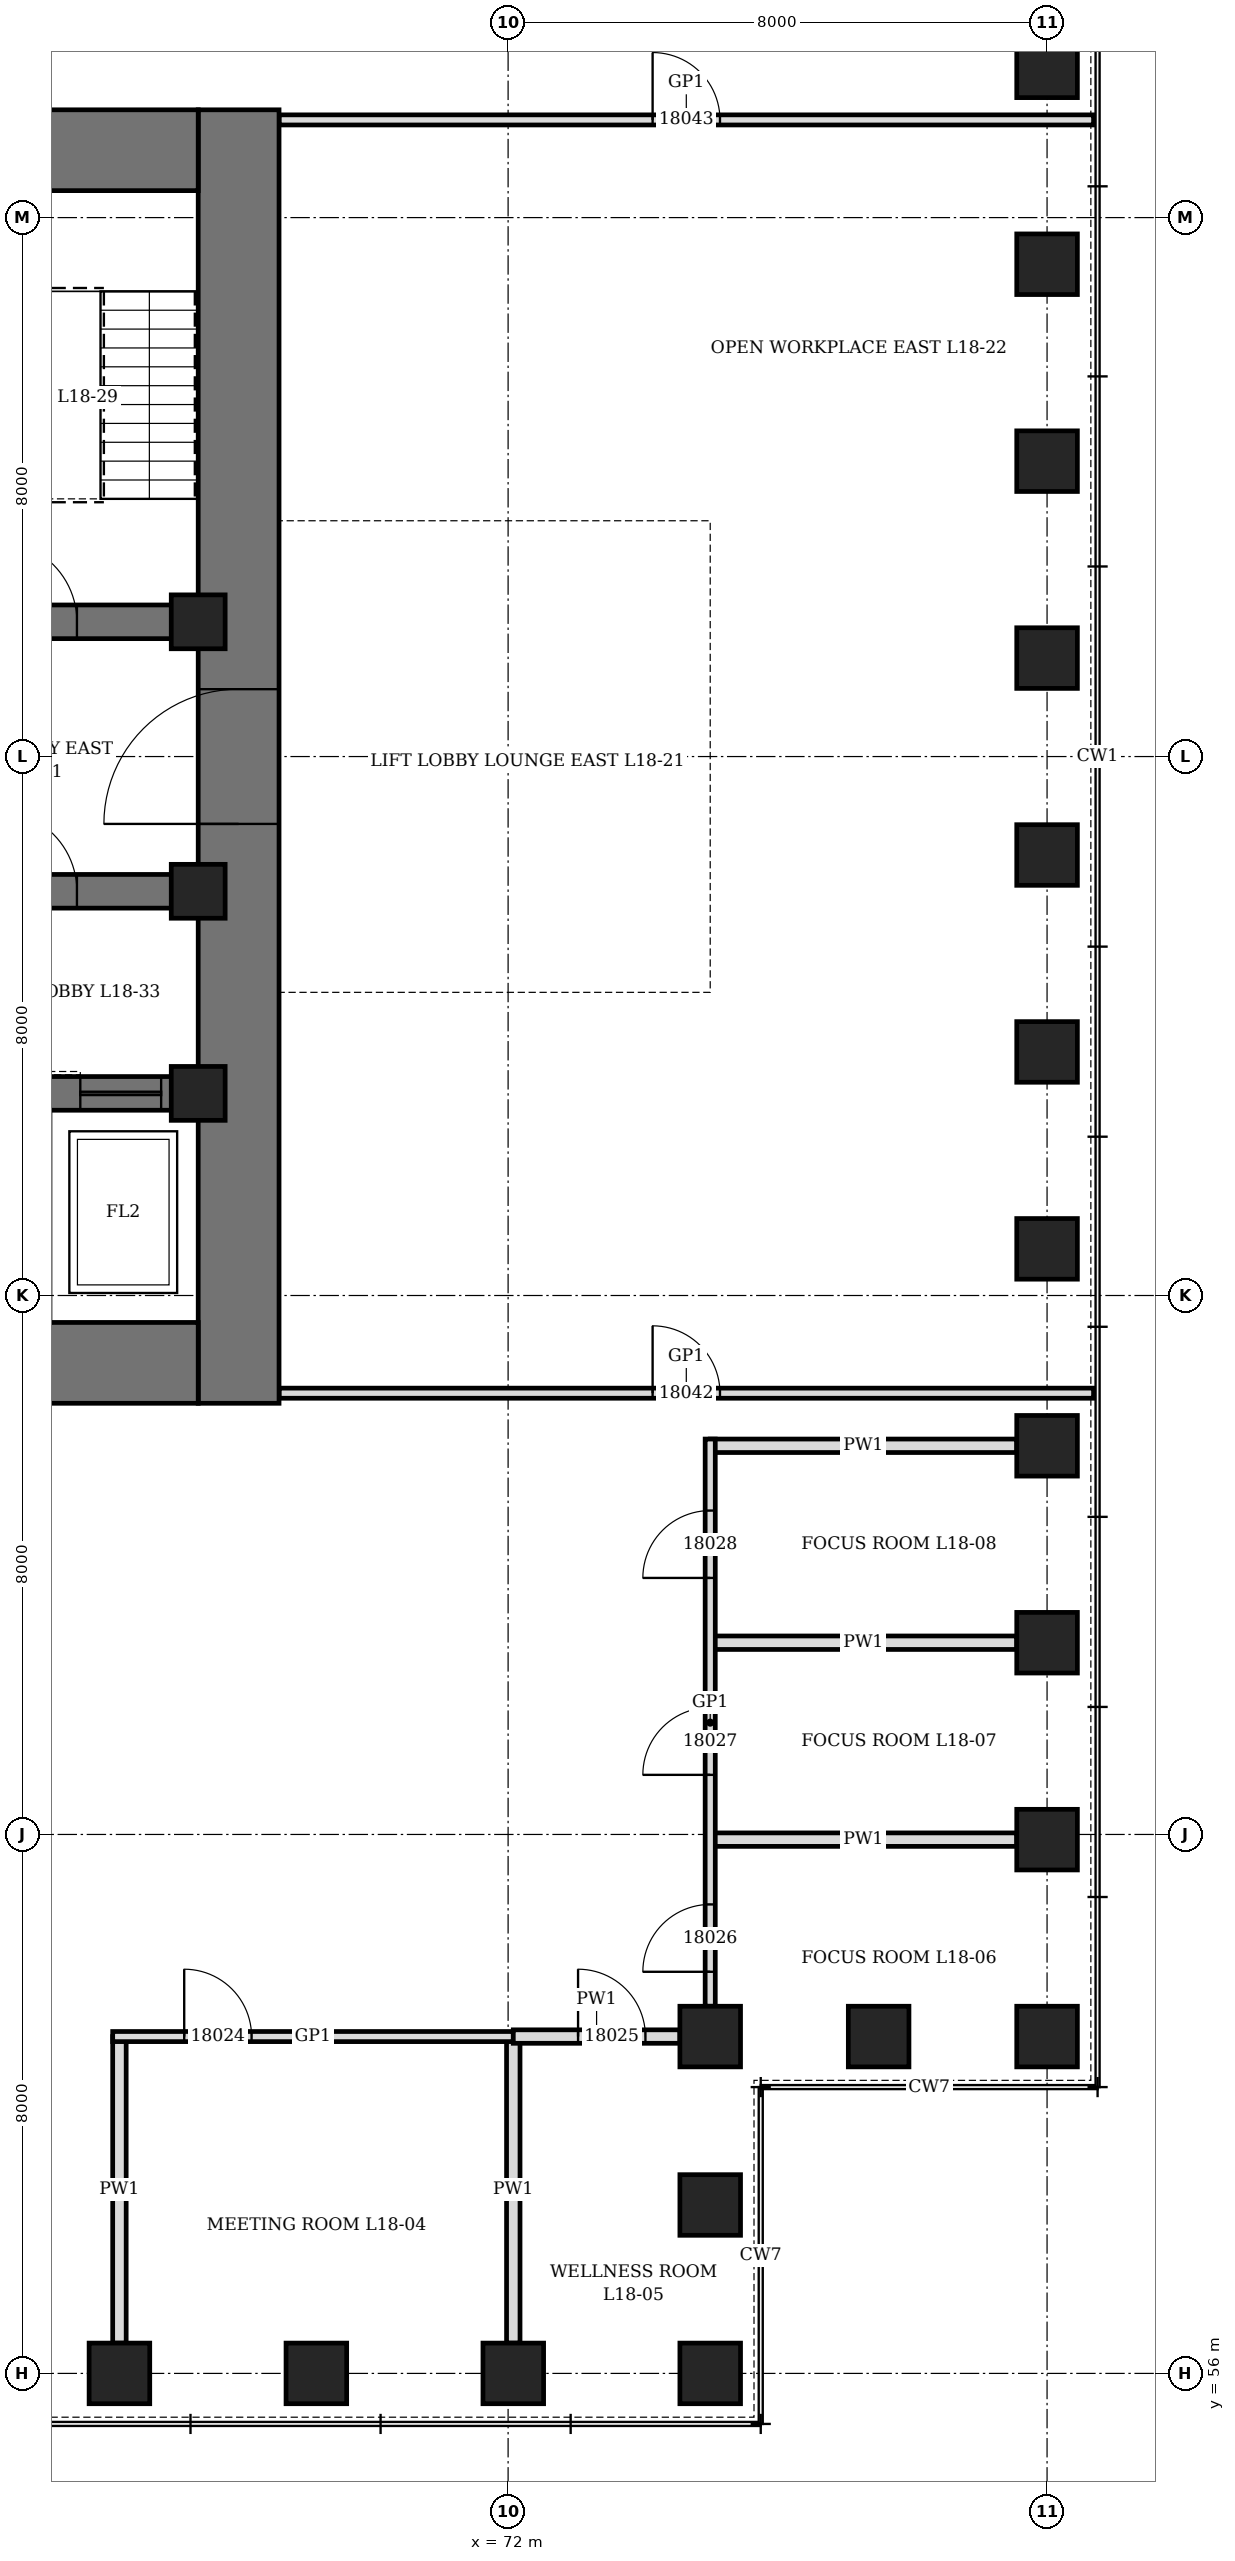
"""IFC4 building model, lengths in metres.
Left out: names, types, materials, properties, quantities, classifications, styles, units other than length and angle.
Written with IfcOpenShell. Run it as: python <this file> out.ifc"""

import sys

from ifc_helpers import new_model, si_unit, direction, frame, frame_2d, origin, origin_2d, place, context, subcontext, project, spatial, rectangle, hollow_rectangle, extrude, element, fill, save


model = new_model("IFC4")
c1 = context("Model", 3, precision=1e-05, world=origin(), true_north=direction((0.0, 1.0)))
c2 = subcontext(c1, "Body", "Model", "MODEL_VIEW")
j1 = project(units=[si_unit("LENGTHUNIT", "METRE"), si_unit("PLANEANGLEUNIT", "RADIAN")], contexts=[c1])
p1 = place(None, origin())
s1 = spatial("IfcSite", under=j1, at=p1, CompositionType="ELEMENT")
p2 = place(p1, origin())
s2 = spatial("IfcBuilding", under=s1, at=p2, CompositionType="ELEMENT")
p3 = place(p2, frame((0.0, 0.0, 85.3)))
s3 = spatial("IfcBuildingStorey", under=s2, at=p3, CompositionType="ELEMENT", Elevation=85.3)
for number, where, z_axis, x_axis in (
    (1, (66.231, 56.0, 0.0), (0.0, 0.0, 1.0), (1.0, 0.0, 0.0)),
    (2, (69.154, 56.0, 0.0), (0.0, 0.0, 1.0), (1.0, 0.0, 0.0)),
    (3, (72.077, 56.0, 0.0), (0.0, 0.0, 1.0), (1.0, 0.0, 0.0)),
    (4, (75.0, 56.0, 0.0), (0.0, 0.0, 1.0), (0.0, 1.0, 0.0)),
    (5, (75.0, 58.5, 0.0), (0.0, 0.0, 1.0), (0.0, 1.0, 0.0)),
    (6, (75.0, 61.0, 0.0), (0.0, 0.0, 1.0), (1.0, 0.0, 0.0)),
    (7, (77.5, 61.0, 0.0), (0.0, 0.0, 1.0), (1.0, 0.0, 0.0)),
    (8, (80.0, 61.0, 0.0), (0.0, 0.0, 1.0), (0.0, 1.0, 0.0)),
    (9, (80.0, 63.923, 0.0), (0.0, 0.0, 1.0), (0.0, 1.0, 0.0)),
    (10, (80.0, 66.846, 0.0), (0.0, 0.0, 1.0), (0.0, 1.0, 0.0)),
    (11, (80.0, 69.769, 0.0), (0.0, 0.0, 1.0), (0.0, 1.0, 0.0)),
    (12, (80.0, 72.692, 0.0), (0.0, 0.0, 1.0), (0.0, 1.0, 0.0)),
    (13, (80.0, 75.615, 0.0), (0.0, 0.0, 1.0), (0.0, 1.0, 0.0)),
    (14, (80.0, 78.539, 0.0), (0.0, 0.0, 1.0), (0.0, 1.0, 0.0)),
    (15, (80.0, 81.461, 0.0), (0.0, 0.0, 1.0), (0.0, 1.0, 0.0)),
    (16, (80.0, 84.385, 0.0), (0.0, 0.0, 1.0), (0.0, 1.0, 0.0)),
    (17, (80.0, 87.308, 0.0), (0.0, 0.0, 1.0), (0.0, 1.0, 0.0)),
    (18, (80.0, 90.231, 0.0), (0.0, 0.0, 1.0), (0.0, 1.0, 0.0)),
):
    element("IfcColumn", number, at=place(p3, frame(where, z_axis=z_axis, x_axis=x_axis)), inside=s3, PredefinedType="COLUMN", context=c2, shape_type="SweptSolid", body=[
        extrude(hollow_rectangle(XDim=0.9, YDim=0.9, WallThickness=0.12, at=origin_2d()), origin(), (0.0, 0.0, 1.0), 4.2),
    ])
p4 = place(p3, frame((68.0, 70.4, 0.0), z_axis=(0.0, 0.0, 1.0), x_axis=(0.0, 1.0, 0.0)))
e19 = element("IfcWall", 19, at=p4, inside=s3, PredefinedType="SHEAR", context=c2, shape_type="SweptSolid", body=[
    extrude(rectangle(XDim=19.2, YDim=1.2, at=frame_2d((9.6, 0.0))), origin(), (0.0, 0.0, 1.0), 4.2),
])
p5 = place(p4, frame((8.6, 0.0, 0.0)))
e20 = element("IfcOpeningElement", 20, at=p5, cuts=e19, PredefinedType="OPENING", context=c2, shape_type="SweptSolid", body=[
    extrude(rectangle(XDim=2.0, YDim=2.4, at=frame_2d((1.0, 1.2))), frame((0.0, 0.61, 0.0), z_axis=(0.0, -1.0, 0.0), x_axis=(1.0, 0.0, 0.0)), (0.0, 0.0, 1.0), 1.22),
])
p6 = place(p3, frame((44.6, 71.0, 0.0), z_axis=(0.0, 0.0, 1.0), x_axis=(1.0, 0.0, 0.0)))
e21 = element("IfcWall", 21, at=p6, inside=s3, PredefinedType="SHEAR", context=c2, shape_type="SweptSolid", body=[
    extrude(rectangle(XDim=22.8, YDim=1.2, at=frame_2d((11.4, 0.0))), origin(), (0.0, 0.0, 1.0), 4.2),
])
p7 = place(p3, frame((44.6, 89.0, 0.0), z_axis=(0.0, 0.0, 1.0), x_axis=(1.0, 0.0, 0.0)))
e22 = element("IfcWall", 22, at=p7, inside=s3, PredefinedType="SHEAR", context=c2, shape_type="SweptSolid", body=[
    extrude(rectangle(XDim=22.8, YDim=1.2, at=frame_2d((11.4, 0.0))), origin(), (0.0, 0.0, 1.0), 4.2),
])
p8 = place(p7, frame((7.9, 0.0, 0.0)))
e23 = element("IfcOpeningElement", 23, at=p8, cuts=e22, PredefinedType="OPENING", context=c2, shape_type="SweptSolid", body=[
    extrude(rectangle(XDim=1.0, YDim=2.1, at=frame_2d((0.5, 1.05))), frame((0.0, 0.61, 0.0), z_axis=(0.0, -1.0, 0.0), x_axis=(1.0, 0.0, 0.0)), (0.0, 0.0, 1.0), 1.22),
])
p9 = place(p7, frame((12.05, 0.0, 0.0)))
e24 = element("IfcOpeningElement", 24, at=p9, cuts=e22, PredefinedType="OPENING", context=c2, shape_type="SweptSolid", body=[
    extrude(rectangle(XDim=0.9, YDim=2.1, at=frame_2d((0.45, 1.05))), frame((0.0, 0.61, 0.0), z_axis=(0.0, -1.0, 0.0), x_axis=(1.0, 0.0, 0.0)), (0.0, 0.0, 1.0), 1.22),
])
p10 = place(p7, frame((13.975, 0.0, 0.0)))
e25 = element("IfcOpeningElement", 25, at=p10, cuts=e22, PredefinedType="OPENING", context=c2, shape_type="SweptSolid", body=[
    extrude(rectangle(XDim=0.9, YDim=2.1, at=frame_2d((0.45, 1.05))), frame((0.0, 0.61, 0.0), z_axis=(0.0, -1.0, 0.0), x_axis=(1.0, 0.0, 0.0)), (0.0, 0.0, 1.0), 1.22),
])
p11 = place(p3, frame((62.25, 75.0, 0.0), z_axis=(0.0, 0.0, 1.0), x_axis=(1.0, 0.0, 0.0)))
e26 = element("IfcWall", 26, at=p11, inside=s3, PredefinedType="SHEAR", context=c2, shape_type="SweptSolid", body=[
    extrude(rectangle(XDim=5.15, YDim=0.5, at=frame_2d((2.575, 0.0))), origin(), (0.0, 0.0, 1.0), 4.2),
])
p12 = place(p11, frame((0.65, 0.0, 0.0)))
e27 = element("IfcOpeningElement", 27, at=p12, cuts=e26, PredefinedType="OPENING", context=c2, shape_type="SweptSolid", body=[
    extrude(rectangle(XDim=1.2, YDim=2.2, at=frame_2d((0.6, 1.1))), frame((0.0, 0.26, 0.0), z_axis=(0.0, -1.0, 0.0), x_axis=(1.0, 0.0, 0.0)), (0.0, 0.0, 1.0), 0.52),
])
p13 = place(p11, frame((3.4, 0.0, 0.0)))
e28 = element("IfcOpeningElement", 28, at=p13, cuts=e26, PredefinedType="OPENING", context=c2, shape_type="SweptSolid", body=[
    extrude(rectangle(XDim=1.2, YDim=2.2, at=frame_2d((0.6, 1.1))), frame((0.0, 0.26, 0.0), z_axis=(0.0, -1.0, 0.0), x_axis=(1.0, 0.0, 0.0)), (0.0, 0.0, 1.0), 0.52),
])
p14 = place(p3, frame((62.25, 78.0, 0.0), z_axis=(0.0, 0.0, 1.0), x_axis=(1.0, 0.0, 0.0)))
e29 = element("IfcWall", 29, at=p14, inside=s3, PredefinedType="SHEAR", context=c2, shape_type="SweptSolid", body=[
    extrude(rectangle(XDim=5.15, YDim=0.5, at=frame_2d((2.575, 0.0))), origin(), (0.0, 0.0, 1.0), 4.2),
])
p15 = place(p14, frame((2.15, 0.0, 0.0)))
e30 = element("IfcOpeningElement", 30, at=p15, cuts=e29, PredefinedType="OPENING", context=c2, shape_type="SweptSolid", body=[
    extrude(rectangle(XDim=1.2, YDim=2.1, at=frame_2d((0.6, 1.05))), frame((0.0, 0.26, 0.0), z_axis=(0.0, -1.0, 0.0), x_axis=(1.0, 0.0, 0.0)), (0.0, 0.0, 1.0), 0.52),
])
p16 = place(p3, frame((62.25, 82.0, 0.0), z_axis=(0.0, 0.0, 1.0), x_axis=(1.0, 0.0, 0.0)))
e31 = element("IfcWall", 31, at=p16, inside=s3, PredefinedType="SHEAR", context=c2, shape_type="SweptSolid", body=[
    extrude(rectangle(XDim=5.15, YDim=0.5, at=frame_2d((2.575, 0.0))), origin(), (0.0, 0.0, 1.0), 4.2),
])
p17 = place(p16, frame((2.15, 0.0, 0.0)))
e32 = element("IfcOpeningElement", 32, at=p17, cuts=e31, PredefinedType="OPENING", context=c2, shape_type="SweptSolid", body=[
    extrude(rectangle(XDim=1.2, YDim=2.1, at=frame_2d((0.6, 1.05))), frame((0.0, 0.26, 0.0), z_axis=(0.0, -1.0, 0.0), x_axis=(1.0, 0.0, 0.0)), (0.0, 0.0, 1.0), 0.52),
])
for number, where, z_axis, x_axis in (
    (33, (67.4, 75.0, 0.0), (0.0, 0.0, 1.0), (1.0, 0.0, 0.0)),
    (34, (67.4, 78.0, 0.0), (0.0, 0.0, 1.0), (1.0, 0.0, 0.0)),
    (35, (67.4, 82.0, 0.0), (0.0, 0.0, 1.0), (1.0, 0.0, 0.0)),
):
    element("IfcColumn", number, at=place(p3, frame(where, z_axis=z_axis, x_axis=x_axis)), inside=s3, PredefinedType="COLUMN", context=c2, shape_type="SweptSolid", body=[
        extrude(hollow_rectangle(XDim=0.8, YDim=0.8, WallThickness=0.1, at=origin_2d()), origin(), (0.0, 0.0, 1.0), 4.2),
    ])
p18 = place(p3, frame((66.231, 56.45, 0.0), z_axis=(0.0, 0.0, 1.0), x_axis=(0.0, 1.0, 0.0)))
e36 = element("IfcWall", 36, at=p18, inside=s3, PredefinedType="PARTITIONING", context=c2, shape_type="SweptSolid", body=[
    extrude(rectangle(XDim=4.55, YDim=0.2, at=frame_2d((2.275, 0.0))), origin(), (0.0, 0.0, 1.0), 3.278),
])
for number, where, z_axis, x_axis in (
    (37, (72.077, 56.45, 0.0), (0.0, 0.0, 1.0), (0.0, 1.0, 0.0)),
    (38, (75.0, 63.923, 0.0), (0.0, 0.0, 1.0), (1.0, 0.0, 0.0)),
    (39, (75.0, 66.846, 0.0), (0.0, 0.0, 1.0), (1.0, 0.0, 0.0)),
    (40, (75.0, 69.769, 0.0), (0.0, 0.0, 1.0), (1.0, 0.0, 0.0)),
):
    element("IfcWall", number, at=place(p3, frame(where, z_axis=z_axis, x_axis=x_axis)), inside=s3, PredefinedType="PARTITIONING", context=c2, shape_type="SweptSolid", body=[
        extrude(rectangle(XDim=4.55, YDim=0.2, at=frame_2d((2.275, 0.0))), origin(), (0.0, 0.0, 1.0), 3.428),
    ])
p19 = place(p3, frame((66.131, 61.0, 0.0), z_axis=(0.0, 0.0, 1.0), x_axis=(1.0, 0.0, 0.0)))
e41 = element("IfcWall", 41, at=p19, inside=s3, PredefinedType="PARTITIONING", context=c2, shape_type="SweptSolid", body=[
    extrude(rectangle(XDim=5.946, YDim=0.15, at=frame_2d((2.973, 0.0))), origin(), (0.0, 0.0, 1.0), 4.04),
])
p20 = place(p19, frame((1.062, 0.0, 0.0)))
e42 = element("IfcOpeningElement", 42, at=p20, cuts=e41, PredefinedType="OPENING", context=c2, shape_type="SweptSolid", body=[
    extrude(rectangle(XDim=1.0, YDim=2.4, at=frame_2d((0.5, 1.2))), frame((0.0, 0.085, 0.0), z_axis=(0.0, -1.0, 0.0), x_axis=(1.0, 0.0, 0.0)), (0.0, 0.0, 1.0), 0.17),
])
p21 = place(p3, frame((72.077, 61.0, 0.0), z_axis=(0.0, 0.0, 1.0), x_axis=(1.0, 0.0, 0.0)))
e43 = element("IfcWall", 43, at=p21, inside=s3, PredefinedType="PARTITIONING", context=c2, shape_type="SweptSolid", body=[
    extrude(rectangle(XDim=2.473, YDim=0.2, at=frame_2d((1.237, 0.0))), origin(), (0.0, 0.0, 1.0), 4.04),
])
p22 = place(p21, frame((0.961, 0.0, 0.0)))
e44 = element("IfcOpeningElement", 44, at=p22, cuts=e43, PredefinedType="OPENING", context=c2, shape_type="SweptSolid", body=[
    extrude(rectangle(XDim=1.0, YDim=2.1, at=frame_2d((0.5, 1.05))), frame((0.0, 0.11, 0.0), z_axis=(0.0, -1.0, 0.0), x_axis=(1.0, 0.0, 0.0)), (0.0, 0.0, 1.0), 0.22),
])
p23 = place(p3, frame((68.6, 70.55, 0.0), z_axis=(0.0, 0.0, 1.0), x_axis=(1.0, 0.0, 0.0)))
e45 = element("IfcWall", 45, at=p23, inside=s3, PredefinedType="PARTITIONING", context=c2, shape_type="SweptSolid", body=[
    extrude(rectangle(XDim=12.09, YDim=0.15, at=frame_2d((6.045, 0.0))), origin(), (0.0, 0.0, 1.0), 4.04),
])
p24 = place(p23, frame((5.545, 0.0, 0.0)))
e46 = element("IfcOpeningElement", 46, at=p24, cuts=e45, PredefinedType="OPENING", context=c2, shape_type="SweptSolid", body=[
    extrude(rectangle(XDim=1.0, YDim=2.4, at=frame_2d((0.5, 1.2))), frame((0.0, 0.085, 0.0), z_axis=(0.0, -1.0, 0.0), x_axis=(1.0, 0.0, 0.0)), (0.0, 0.0, 1.0), 0.17),
])
p25 = place(p3, frame((68.6, 89.45, 0.0), z_axis=(0.0, 0.0, 1.0), x_axis=(1.0, 0.0, 0.0)))
e47 = element("IfcWall", 47, at=p25, inside=s3, PredefinedType="PARTITIONING", context=c2, shape_type="SweptSolid", body=[
    extrude(rectangle(XDim=12.09, YDim=0.15, at=frame_2d((6.045, 0.0))), origin(), (0.0, 0.0, 1.0), 4.04),
])
p26 = place(p25, frame((5.545, 0.0, 0.0)))
e48 = element("IfcOpeningElement", 48, at=p26, cuts=e47, PredefinedType="OPENING", context=c2, shape_type="SweptSolid", body=[
    extrude(rectangle(XDim=1.0, YDim=2.4, at=frame_2d((0.5, 1.2))), frame((0.0, 0.085, 0.0), z_axis=(0.0, -1.0, 0.0), x_axis=(1.0, 0.0, 0.0)), (0.0, 0.0, 1.0), 0.17),
])
p27 = place(p3, frame((75.0, 61.45, 0.0), z_axis=(0.0, 0.0, 1.0), x_axis=(0.0, 1.0, 0.0)))
e49 = element("IfcWall", 49, at=p27, inside=s3, PredefinedType="PARTITIONING", context=c2, shape_type="SweptSolid", body=[
    extrude(rectangle(XDim=8.419, YDim=0.15, at=frame_2d((4.209, 0.0))), origin(), (0.0, 0.0, 1.0), 4.04),
])
p28 = place(p27, frame((0.511, 0.0, 0.0)))
e50 = element("IfcOpeningElement", 50, at=p28, cuts=e49, PredefinedType="OPENING", context=c2, shape_type="SweptSolid", body=[
    extrude(rectangle(XDim=1.0, YDim=2.4, at=frame_2d((0.5, 1.2))), frame((0.0, 0.085, 0.0), z_axis=(0.0, -1.0, 0.0), x_axis=(1.0, 0.0, 0.0)), (0.0, 0.0, 1.0), 0.17),
])
p29 = place(p27, frame((3.435, 0.0, 0.0)))
e51 = element("IfcOpeningElement", 51, at=p29, cuts=e49, PredefinedType="OPENING", context=c2, shape_type="SweptSolid", body=[
    extrude(rectangle(XDim=1.0, YDim=2.4, at=frame_2d((0.5, 1.2))), frame((0.0, 0.085, 0.0), z_axis=(0.0, -1.0, 0.0), x_axis=(1.0, 0.0, 0.0)), (0.0, 0.0, 1.0), 0.17),
])
p30 = place(p27, frame((6.358, 0.0, 0.0)))
e52 = element("IfcOpeningElement", 52, at=p30, cuts=e49, PredefinedType="OPENING", context=c2, shape_type="SweptSolid", body=[
    extrude(rectangle(XDim=1.0, YDim=2.4, at=frame_2d((0.5, 1.2))), frame((0.0, 0.085, 0.0), z_axis=(0.0, -1.0, 0.0), x_axis=(1.0, 0.0, 0.0)), (0.0, 0.0, 1.0), 0.17),
])
p31 = place(p17, origin())
e53 = element("IfcDoor", 53, at=p31, inside=s3, OperationType="SINGLE_SWING_LEFT", PredefinedType="DOOR", context=c2, shape_type="SweptSolid", body=[
    extrude(rectangle(XDim=1.2, YDim=2.1, at=frame_2d((0.6, 1.05))), frame((0.0, 0.25, 0.0), z_axis=(0.0, -1.0, 0.0), x_axis=(1.0, 0.0, 0.0)), (0.0, 0.0, 1.0), 0.5),
])
fill(e32, e53)
p32 = place(p5, origin())
e54 = element("IfcDoor", 54, at=p32, inside=s3, OperationType="DOUBLE_DOOR_SINGLE_SWING", PredefinedType="DOOR", context=c2, shape_type="SweptSolid", body=[
    extrude(rectangle(XDim=2.0, YDim=2.4, at=frame_2d((1.0, 1.2))), frame((0.0, 0.35, 0.0), z_axis=(0.0, -1.0, 0.0), x_axis=(1.0, 0.0, 0.0)), (0.0, 0.0, 1.0), 0.7),
])
fill(e20, e54)
p33 = place(p15, origin())
e55 = element("IfcDoor", 55, at=p33, inside=s3, OperationType="SINGLE_SWING_RIGHT", PredefinedType="DOOR", context=c2, shape_type="SweptSolid", body=[
    extrude(rectangle(XDim=1.2, YDim=2.1, at=frame_2d((0.6, 1.05))), frame((0.0, 0.25, 0.0), z_axis=(0.0, -1.0, 0.0), x_axis=(1.0, 0.0, 0.0)), (0.0, 0.0, 1.0), 0.5),
])
fill(e30, e55)
p34 = place(p13, origin())
e56 = element("IfcDoor", 56, at=p34, inside=s3, OperationType="SLIDING_TO_LEFT", PredefinedType="DOOR", context=c2, shape_type="SweptSolid", body=[
    extrude(rectangle(XDim=1.2, YDim=2.2, at=frame_2d((0.6, 1.1))), frame((0.0, 0.25, 0.0), z_axis=(0.0, -1.0, 0.0), x_axis=(1.0, 0.0, 0.0)), (0.0, 0.0, 1.0), 0.5),
])
fill(e28, e56)
p35 = place(p20, origin())
e57 = element("IfcDoor", 57, at=p35, inside=s3, OperationType="SINGLE_SWING_RIGHT", PredefinedType="DOOR", context=c2, shape_type="SweptSolid", body=[
    extrude(rectangle(XDim=1.0, YDim=2.4, at=frame_2d((0.5, 1.2))), frame((0.0, 0.075, 0.0), z_axis=(0.0, -1.0, 0.0), x_axis=(1.0, 0.0, 0.0)), (0.0, 0.0, 1.0), 0.149),
])
fill(e42, e57)
p36 = place(p22, origin())
e58 = element("IfcDoor", 58, at=p36, inside=s3, OperationType="SINGLE_SWING_LEFT", PredefinedType="DOOR", context=c2, shape_type="SweptSolid", body=[
    extrude(rectangle(XDim=1.0, YDim=2.1, at=frame_2d((0.5, 1.05))), frame((0.0, 0.1, 0.0), z_axis=(0.0, -1.0, 0.0), x_axis=(1.0, 0.0, 0.0)), (0.0, 0.0, 1.0), 0.199),
])
fill(e44, e58)
p37 = place(p28, origin())
e59 = element("IfcDoor", 59, at=p37, inside=s3, OperationType="SINGLE_SWING_RIGHT", PredefinedType="DOOR", context=c2, shape_type="SweptSolid", body=[
    extrude(rectangle(XDim=1.0, YDim=2.4, at=frame_2d((0.5, 1.2))), frame((0.0, 0.075, 0.0), z_axis=(0.0, -1.0, 0.0), x_axis=(1.0, 0.0, 0.0)), (0.0, 0.0, 1.0), 0.149),
])
fill(e50, e59)
p38 = place(p29, origin())
e60 = element("IfcDoor", 60, at=p38, inside=s3, OperationType="SINGLE_SWING_RIGHT", PredefinedType="DOOR", context=c2, shape_type="SweptSolid", body=[
    extrude(rectangle(XDim=1.0, YDim=2.4, at=frame_2d((0.5, 1.2))), frame((0.0, 0.075, 0.0), z_axis=(0.0, -1.0, 0.0), x_axis=(1.0, 0.0, 0.0)), (0.0, 0.0, 1.0), 0.149),
])
fill(e51, e60)
p39 = place(p30, origin())
e61 = element("IfcDoor", 61, at=p39, inside=s3, OperationType="SINGLE_SWING_RIGHT", PredefinedType="DOOR", context=c2, shape_type="SweptSolid", body=[
    extrude(rectangle(XDim=1.0, YDim=2.4, at=frame_2d((0.5, 1.2))), frame((0.0, 0.075, 0.0), z_axis=(0.0, -1.0, 0.0), x_axis=(1.0, 0.0, 0.0)), (0.0, 0.0, 1.0), 0.149),
])
fill(e52, e61)
p40 = place(p24, origin())
e62 = element("IfcDoor", 62, at=p40, inside=s3, OperationType="SINGLE_SWING_RIGHT", PredefinedType="DOOR", context=c2, shape_type="SweptSolid", body=[
    extrude(rectangle(XDim=1.0, YDim=2.4, at=frame_2d((0.5, 1.2))), frame((0.0, 0.075, 0.0), z_axis=(0.0, -1.0, 0.0), x_axis=(1.0, 0.0, 0.0)), (0.0, 0.0, 1.0), 0.149),
])
fill(e46, e62)
p41 = place(p26, origin())
e63 = element("IfcDoor", 63, at=p41, inside=s3, OperationType="SINGLE_SWING_RIGHT", PredefinedType="DOOR", context=c2, shape_type="SweptSolid", body=[
    extrude(rectangle(XDim=1.0, YDim=2.4, at=frame_2d((0.5, 1.2))), frame((0.0, 0.075, 0.0), z_axis=(0.0, -1.0, 0.0), x_axis=(1.0, 0.0, 0.0)), (0.0, 0.0, 1.0), 0.149),
])
fill(e48, e63)
save(model, sys.argv[1])
